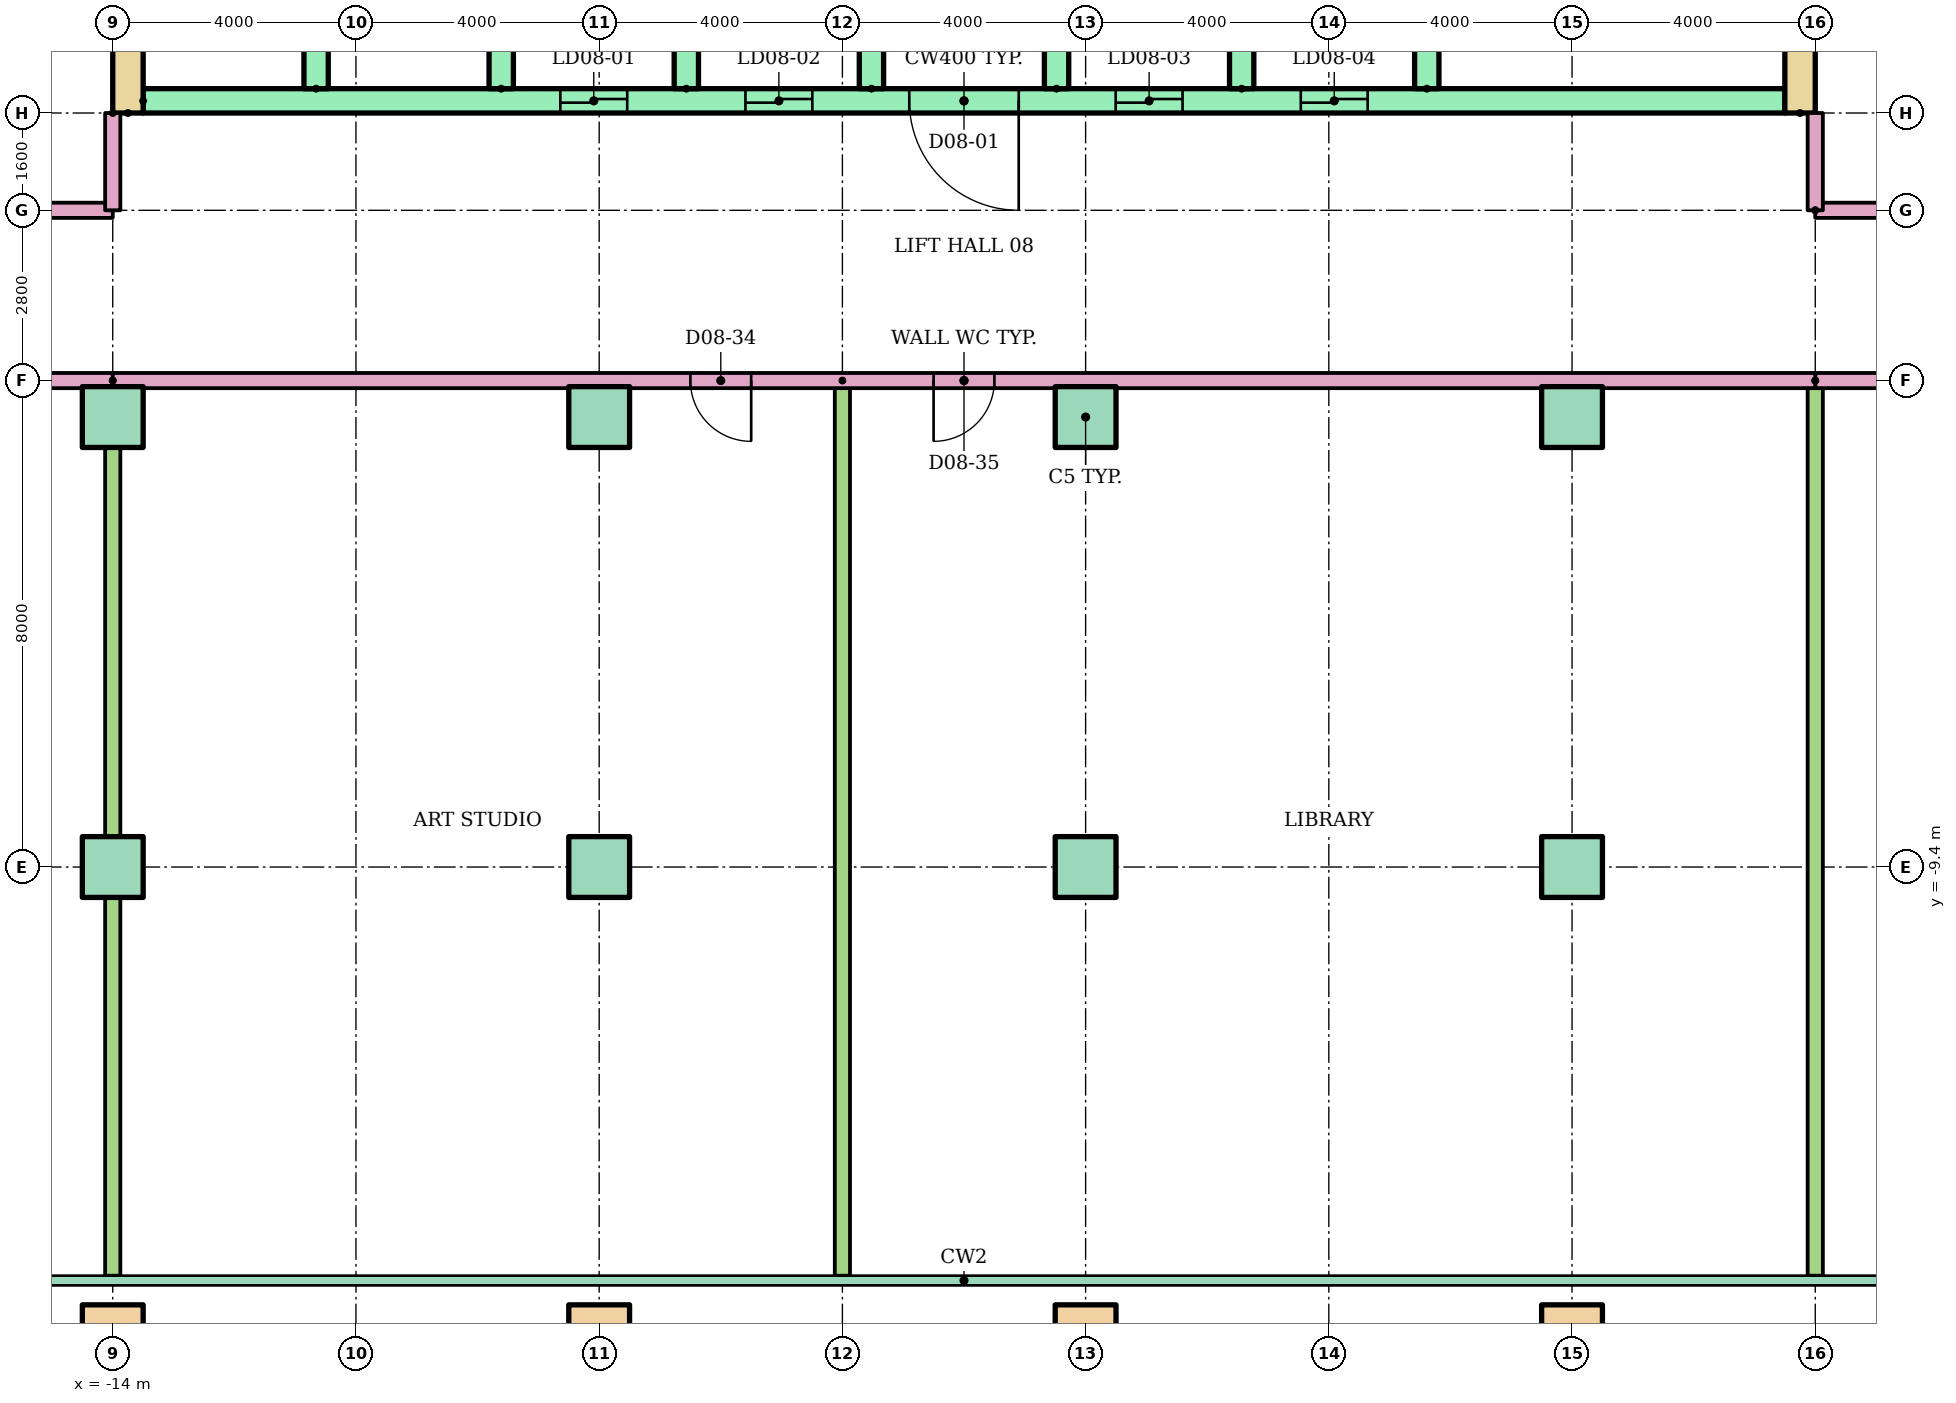
"""IFC4 building model, lengths in metres.
Left out: names, types, materials, properties, quantities, classifications, styles, units other than length and angle.
Written with IfcOpenShell. Run it as: python <this file> out.ifc"""

import sys

from ifc_helpers import new_model, si_unit, direction, frame, frame_2d, origin, origin_2d, place, context, subcontext, project, spatial, rectangle, hollow_rectangle, extrude, element, fill, save


model = new_model("IFC4")
c1 = context("Model", 3, precision=1e-05, world=origin(), true_north=direction((0.0, 1.0)))
c2 = subcontext(c1, "Body", "Model", "MODEL_VIEW")
j1 = project(units=[si_unit("LENGTHUNIT", "METRE"), si_unit("PLANEANGLEUNIT", "RADIAN")], contexts=[c1])
p1 = place(None, origin())
s1 = spatial("IfcSite", under=j1, at=p1, CompositionType="ELEMENT")
p2 = place(p1, origin())
s2 = spatial("IfcBuilding", under=s1, at=p2, CompositionType="ELEMENT")
p3 = place(p2, frame((0.0, 0.0, 33.8)))
s3 = spatial("IfcBuildingStorey", under=s2, at=p3, CompositionType="ELEMENT", Elevation=33.8)
for number, where in (
    (1, (-14.0, -17.1, 0.0)),
    (2, (-6.0, -17.1, 0.0)),
    (3, (2.0, -17.1, 0.0)),
    (4, (10.0, -17.1, 0.0)),
):
    element("IfcColumn", number, at=place(p3, frame(where)), inside=s3, PredefinedType="COLUMN", context=c2, shape_type="SweptSolid", body=[
        extrude(hollow_rectangle(XDim=1.0, YDim=1.0, WallThickness=0.05, at=origin_2d()), origin(), (0.0, 0.0, 1.0), 3.9),
    ])
for number, where in (
    (5, (-14.0, -9.4, 0.0)),
    (6, (-6.0, -9.4, 0.0)),
    (7, (2.0, -9.4, 0.0)),
    (8, (10.0, -9.4, 0.0)),
    (9, (-14.0, -2.0, 0.0)),
    (10, (-6.0, -2.0, 0.0)),
    (11, (2.0, -2.0, 0.0)),
    (12, (10.0, -2.0, 0.0)),
):
    element("IfcColumn", number, at=place(p3, frame(where)), inside=s3, PredefinedType="COLUMN", context=c2, shape_type="SweptSolid", body=[
        extrude(rectangle(XDim=1.0, YDim=1.0, at=origin_2d()), origin(), (0.0, 0.0, 1.0), 3.9),
    ])
for number, where, z_axis, x_axis in (
    (13, (-13.75, 3.0, 0.0), (0.0, 0.0, 1.0), (0.0, 1.0, 0.0)),
    (14, (13.75, 3.0, 0.0), (0.0, 0.0, 1.0), (0.0, 1.0, 0.0)),
):
    element("IfcWall", number, at=place(p3, frame(where, z_axis=z_axis, x_axis=x_axis)), inside=s3, PredefinedType="SHEAR", context=c2, shape_type="SweptSolid", body=[
        extrude(rectangle(XDim=17.0, YDim=0.5, at=frame_2d((8.5, 0.0))), origin(), (0.0, 0.0, 1.0), 3.6),
    ])
p4 = place(p3, frame((-13.5, 3.2, 0.0)))
e15 = element("IfcWall", 15, at=p4, inside=s3, PredefinedType="SHEAR", context=c2, shape_type="SweptSolid", body=[
    extrude(rectangle(XDim=27.0, YDim=0.4, at=frame_2d((13.5, 0.0))), origin(), (0.0, 0.0, 1.0), 3.6),
])
p5 = place(p4, frame((6.861, 0.0, 0.0)))
e16 = element("IfcOpeningElement", 16, at=p5, cuts=e15, PredefinedType="OPENING", context=c2, shape_type="SweptSolid", body=[
    extrude(rectangle(XDim=1.1, YDim=2.1, at=frame_2d((0.55, 1.05))), frame((0.0, 0.21, 0.0), z_axis=(0.0, -1.0, 0.0), x_axis=(1.0, 0.0, 0.0)), (0.0, 0.0, 1.0), 0.42),
])
p6 = place(p4, frame((9.906, 0.0, 0.0)))
e17 = element("IfcOpeningElement", 17, at=p6, cuts=e15, PredefinedType="OPENING", context=c2, shape_type="SweptSolid", body=[
    extrude(rectangle(XDim=1.1, YDim=2.1, at=frame_2d((0.55, 1.05))), frame((0.0, 0.21, 0.0), z_axis=(0.0, -1.0, 0.0), x_axis=(1.0, 0.0, 0.0)), (0.0, 0.0, 1.0), 0.42),
])
p7 = place(p4, frame((15.994, 0.0, 0.0)))
e18 = element("IfcOpeningElement", 18, at=p7, cuts=e15, PredefinedType="OPENING", context=c2, shape_type="SweptSolid", body=[
    extrude(rectangle(XDim=1.1, YDim=2.1, at=frame_2d((0.55, 1.05))), frame((0.0, 0.21, 0.0), z_axis=(0.0, -1.0, 0.0), x_axis=(1.0, 0.0, 0.0)), (0.0, 0.0, 1.0), 0.42),
])
p8 = place(p4, frame((19.039, 0.0, 0.0)))
e19 = element("IfcOpeningElement", 19, at=p8, cuts=e15, PredefinedType="OPENING", context=c2, shape_type="SweptSolid", body=[
    extrude(rectangle(XDim=1.1, YDim=2.1, at=frame_2d((0.55, 1.05))), frame((0.0, 0.21, 0.0), z_axis=(0.0, -1.0, 0.0), x_axis=(1.0, 0.0, 0.0)), (0.0, 0.0, 1.0), 0.42),
])
p9 = place(p4, frame((12.6, 0.0, 0.0)))
e20 = element("IfcOpeningElement", 20, at=p9, cuts=e15, PredefinedType="OPENING", context=c2, shape_type="SweptSolid", body=[
    extrude(rectangle(XDim=1.8, YDim=2.1, at=frame_2d((0.9, 1.05))), frame((0.0, 0.21, 0.0), z_axis=(0.0, -1.0, 0.0), x_axis=(1.0, 0.0, 0.0)), (0.0, 0.0, 1.0), 0.42),
])
for number, where, z_axis, x_axis in (
    (21, (-10.656, 3.4, 0.0), (0.0, 0.0, 1.0), (0.0, 1.0, 0.0)),
    (22, (-7.611, 3.4, 0.0), (0.0, 0.0, 1.0), (0.0, 1.0, 0.0)),
    (23, (-4.567, 3.4, 0.0), (0.0, 0.0, 1.0), (0.0, 1.0, 0.0)),
    (24, (-1.522, 3.4, 0.0), (0.0, 0.0, 1.0), (0.0, 1.0, 0.0)),
    (25, (1.522, 3.4, 0.0), (0.0, 0.0, 1.0), (0.0, 1.0, 0.0)),
    (26, (4.567, 3.4, 0.0), (0.0, 0.0, 1.0), (0.0, 1.0, 0.0)),
    (27, (7.611, 3.4, 0.0), (0.0, 0.0, 1.0), (0.0, 1.0, 0.0)),
):
    element("IfcWall", number, at=place(p3, frame(where, z_axis=z_axis, x_axis=x_axis)), inside=s3, PredefinedType="SHEAR", context=c2, shape_type="SweptSolid", body=[
        extrude(rectangle(XDim=3.0, YDim=0.4, at=frame_2d((1.5, 0.0))), origin(), (0.0, 0.0, 1.0), 3.6),
    ])
p10 = place(p3, frame((-14.0, -1.4, 0.0), z_axis=(0.0, 0.0, 1.0), x_axis=(-1.0, 0.0, 0.0)))
e28 = element("IfcWall", 28, at=p10, inside=s3, PredefinedType="PARTITIONING", context=c2, shape_type="SweptSolid", body=[
    extrude(rectangle(XDim=15.0, YDim=0.25, at=frame_2d((7.5, 0.0))), origin(), (0.0, 0.0, 1.0), 3.1),
])
p11 = place(p10, frame((1.5, 0.0, 0.0)))
e29 = element("IfcOpeningElement", 29, at=p11, cuts=e28, PredefinedType="OPENING", context=c2, shape_type="SweptSolid", body=[
    extrude(rectangle(XDim=1.0, YDim=2.1, at=frame_2d((0.5, 1.05))), frame((0.0, 0.135, 0.0), z_axis=(0.0, -1.0, 0.0), x_axis=(1.0, 0.0, 0.0)), (0.0, 0.0, 1.0), 0.27),
])
p12 = place(p10, frame((8.555, 0.0, 0.0)))
e30 = element("IfcOpeningElement", 30, at=p12, cuts=e28, PredefinedType="OPENING", context=c2, shape_type="SweptSolid", body=[
    extrude(rectangle(XDim=0.9, YDim=2.1, at=frame_2d((0.45, 1.05))), frame((0.0, 0.135, 0.0), z_axis=(0.0, -1.0, 0.0), x_axis=(1.0, 0.0, 0.0)), (0.0, 0.0, 1.0), 0.27),
])
p13 = place(p10, frame((13.5, 0.0, 0.0)))
e31 = element("IfcOpeningElement", 31, at=p13, cuts=e28, PredefinedType="OPENING", context=c2, shape_type="SweptSolid", body=[
    extrude(rectangle(XDim=1.0, YDim=2.1, at=frame_2d((0.5, 1.05))), frame((0.0, 0.135, 0.0), z_axis=(0.0, -1.0, 0.0), x_axis=(1.0, 0.0, 0.0)), (0.0, 0.0, 1.0), 0.27),
])
p14 = place(p3, frame((-14.0, -1.4, 0.0), z_axis=(0.0, 0.0, 1.0), x_axis=(0.0, -1.0, 0.0)))
e32 = element("IfcWall", 32, at=p14, inside=s3, PredefinedType="PARTITIONING", context=c2, shape_type="SweptSolid", body=[
    extrude(rectangle(XDim=14.721, YDim=0.25, at=frame_2d((7.361, 0.0))), origin(), (0.0, 0.0, 1.0), 3.1),
])
p15 = place(p3, frame((-29.0, 1.4, 0.0)))
e33 = element("IfcWall", 33, at=p15, inside=s3, PredefinedType="PARTITIONING", context=c2, shape_type="SweptSolid", body=[
    extrude(rectangle(XDim=15.0, YDim=0.25, at=frame_2d((7.5, 0.0))), origin(), (0.0, 0.0, 1.0), 3.1),
])
p16 = place(p15, frame((12.5, 0.0, 0.0)))
e34 = element("IfcOpeningElement", 34, at=p16, cuts=e33, PredefinedType="OPENING", context=c2, shape_type="SweptSolid", body=[
    extrude(rectangle(XDim=1.0, YDim=2.1, at=frame_2d((0.5, 1.05))), frame((0.0, 0.135, 0.0), z_axis=(0.0, -1.0, 0.0), x_axis=(1.0, 0.0, 0.0)), (0.0, 0.0, 1.0), 0.27),
])
p17 = place(p15, frame((0.5, 0.0, 0.0)))
e35 = element("IfcOpeningElement", 35, at=p17, cuts=e33, PredefinedType="OPENING", context=c2, shape_type="SweptSolid", body=[
    extrude(rectangle(XDim=1.0, YDim=2.1, at=frame_2d((0.5, 1.05))), frame((0.0, 0.135, 0.0), z_axis=(0.0, -1.0, 0.0), x_axis=(1.0, 0.0, 0.0)), (0.0, 0.0, 1.0), 0.27),
])
p18 = place(p3, frame((29.0, -1.4, 0.0), z_axis=(0.0, 0.0, 1.0), x_axis=(-1.0, 0.0, 0.0)))
e36 = element("IfcWall", 36, at=p18, inside=s3, PredefinedType="PARTITIONING", context=c2, shape_type="SweptSolid", body=[
    extrude(rectangle(XDim=15.0, YDim=0.25, at=frame_2d((7.5, 0.0))), origin(), (0.0, 0.0, 1.0), 3.1),
])
p19 = place(p18, frame((12.5, 0.0, 0.0)))
e37 = element("IfcOpeningElement", 37, at=p19, cuts=e36, PredefinedType="OPENING", context=c2, shape_type="SweptSolid", body=[
    extrude(rectangle(XDim=1.0, YDim=2.1, at=frame_2d((0.5, 1.05))), frame((0.0, 0.135, 0.0), z_axis=(0.0, -1.0, 0.0), x_axis=(1.0, 0.0, 0.0)), (0.0, 0.0, 1.0), 0.27),
])
p20 = place(p18, frame((0.5, 0.0, 0.0)))
e38 = element("IfcOpeningElement", 38, at=p20, cuts=e36, PredefinedType="OPENING", context=c2, shape_type="SweptSolid", body=[
    extrude(rectangle(XDim=1.0, YDim=2.1, at=frame_2d((0.5, 1.05))), frame((0.0, 0.135, 0.0), z_axis=(0.0, -1.0, 0.0), x_axis=(1.0, 0.0, 0.0)), (0.0, 0.0, 1.0), 0.27),
])
p21 = place(p3, frame((14.0, -1.4, 0.0), z_axis=(0.0, 0.0, 1.0), x_axis=(0.0, -1.0, 0.0)))
e39 = element("IfcWall", 39, at=p21, inside=s3, PredefinedType="PARTITIONING", context=c2, shape_type="SweptSolid", body=[
    extrude(rectangle(XDim=14.721, YDim=0.25, at=frame_2d((7.361, 0.0))), origin(), (0.0, 0.0, 1.0), 3.1),
])
p22 = place(p3, frame((14.0, 1.4, 0.0)))
e40 = element("IfcWall", 40, at=p22, inside=s3, PredefinedType="PARTITIONING", context=c2, shape_type="SweptSolid", body=[
    extrude(rectangle(XDim=15.0, YDim=0.25, at=frame_2d((7.5, 0.0))), origin(), (0.0, 0.0, 1.0), 3.1),
])
p23 = place(p22, frame((1.5, 0.0, 0.0)))
e41 = element("IfcOpeningElement", 41, at=p23, cuts=e40, PredefinedType="OPENING", context=c2, shape_type="SweptSolid", body=[
    extrude(rectangle(XDim=1.0, YDim=2.1, at=frame_2d((0.5, 1.05))), frame((0.0, 0.135, 0.0), z_axis=(0.0, -1.0, 0.0), x_axis=(1.0, 0.0, 0.0)), (0.0, 0.0, 1.0), 0.27),
])
p24 = place(p22, frame((8.3, 0.0, 0.0)))
e42 = element("IfcOpeningElement", 42, at=p24, cuts=e40, PredefinedType="OPENING", context=c2, shape_type="SweptSolid", body=[
    extrude(rectangle(XDim=1.0, YDim=2.1, at=frame_2d((0.5, 1.05))), frame((0.0, 0.135, 0.0), z_axis=(0.0, -1.0, 0.0), x_axis=(1.0, 0.0, 0.0)), (0.0, 0.0, 1.0), 0.27),
])
p25 = place(p22, frame((13.5, 0.0, 0.0)))
e43 = element("IfcOpeningElement", 43, at=p25, cuts=e40, PredefinedType="OPENING", context=c2, shape_type="SweptSolid", body=[
    extrude(rectangle(XDim=1.0, YDim=2.1, at=frame_2d((0.5, 1.05))), frame((0.0, 0.135, 0.0), z_axis=(0.0, -1.0, 0.0), x_axis=(1.0, 0.0, 0.0)), (0.0, 0.0, 1.0), 0.27),
])
p26 = place(p3, frame((-2.0, -1.4, 0.0), z_axis=(0.0, 0.0, 1.0), x_axis=(0.0, -1.0, 0.0)))
e44 = element("IfcWall", 44, at=p26, inside=s3, PredefinedType="PARTITIONING", context=c2, shape_type="SweptSolid", body=[
    extrude(rectangle(XDim=14.721, YDim=0.25, at=frame_2d((7.361, 0.0))), origin(), (0.0, 0.0, 1.0), 3.1),
])
p27 = place(p3, frame((14.0, -1.4, 0.0), z_axis=(0.0, 0.0, 1.0), x_axis=(-1.0, 0.0, 0.0)))
e45 = element("IfcWall", 45, at=p27, inside=s3, PredefinedType="PARTITIONING", context=c2, shape_type="SweptSolid", body=[
    extrude(rectangle(XDim=28.0, YDim=0.25, at=frame_2d((14.0, 0.0))), origin(), (0.0, 0.0, 1.0), 3.1),
])
p28 = place(p27, frame((17.5, 0.0, 0.0)))
e46 = element("IfcOpeningElement", 46, at=p28, cuts=e45, PredefinedType="OPENING", context=c2, shape_type="SweptSolid", body=[
    extrude(rectangle(XDim=1.0, YDim=2.1, at=frame_2d((0.5, 1.05))), frame((0.0, 0.135, 0.0), z_axis=(0.0, -1.0, 0.0), x_axis=(1.0, 0.0, 0.0)), (0.0, 0.0, 1.0), 0.27),
])
p29 = place(p27, frame((13.5, 0.0, 0.0)))
e47 = element("IfcOpeningElement", 47, at=p29, cuts=e45, PredefinedType="OPENING", context=c2, shape_type="SweptSolid", body=[
    extrude(rectangle(XDim=1.0, YDim=2.1, at=frame_2d((0.5, 1.05))), frame((0.0, 0.135, 0.0), z_axis=(0.0, -1.0, 0.0), x_axis=(1.0, 0.0, 0.0)), (0.0, 0.0, 1.0), 0.27),
])
for number, where, z_axis, x_axis in (
    (48, (-14.0, 3.0, 0.0), (0.0, 0.0, 1.0), (0.0, -1.0, 0.0)),
    (49, (14.0, 1.4, 0.0), (0.0, 0.0, 1.0), (0.0, 1.0, 0.0)),
):
    element("IfcWall", number, at=place(p3, frame(where, z_axis=z_axis, x_axis=x_axis)), inside=s3, PredefinedType="PARTITIONING", context=c2, shape_type="SweptSolid", body=[
        extrude(rectangle(XDim=1.6, YDim=0.25, at=frame_2d((0.8, 0.0))), origin(), (0.0, 0.0, 1.0), 3.1),
    ])
p30 = place(p5, origin())
e50 = element("IfcDoor", 50, at=p30, inside=s3, OperationType="SLIDING_TO_LEFT", PredefinedType="DOOR", context=c2, shape_type="SweptSolid", body=[
    extrude(rectangle(XDim=1.1, YDim=2.1, at=frame_2d((0.55, 1.05))), frame((0.0, 0.025, 0.0), z_axis=(0.0, -1.0, 0.0), x_axis=(1.0, 0.0, 0.0)), (0.0, 0.0, 1.0), 0.05),
])
fill(e16, e50)
p31 = place(p6, origin())
e51 = element("IfcDoor", 51, at=p31, inside=s3, OperationType="SLIDING_TO_LEFT", PredefinedType="DOOR", context=c2, shape_type="SweptSolid", body=[
    extrude(rectangle(XDim=1.1, YDim=2.1, at=frame_2d((0.55, 1.05))), frame((0.0, 0.025, 0.0), z_axis=(0.0, -1.0, 0.0), x_axis=(1.0, 0.0, 0.0)), (0.0, 0.0, 1.0), 0.05),
])
fill(e17, e51)
p32 = place(p7, origin())
e52 = element("IfcDoor", 52, at=p32, inside=s3, OperationType="SLIDING_TO_LEFT", PredefinedType="DOOR", context=c2, shape_type="SweptSolid", body=[
    extrude(rectangle(XDim=1.1, YDim=2.1, at=frame_2d((0.55, 1.05))), frame((0.0, 0.025, 0.0), z_axis=(0.0, -1.0, 0.0), x_axis=(1.0, 0.0, 0.0)), (0.0, 0.0, 1.0), 0.05),
])
fill(e18, e52)
p33 = place(p8, origin())
e53 = element("IfcDoor", 53, at=p33, inside=s3, OperationType="SLIDING_TO_LEFT", PredefinedType="DOOR", context=c2, shape_type="SweptSolid", body=[
    extrude(rectangle(XDim=1.1, YDim=2.1, at=frame_2d((0.55, 1.05))), frame((0.0, 0.025, 0.0), z_axis=(0.0, -1.0, 0.0), x_axis=(1.0, 0.0, 0.0)), (0.0, 0.0, 1.0), 0.05),
])
fill(e19, e53)
p34 = place(p9, frame((1.8, 0.0, 0.0), z_axis=(0.0, 0.0, 1.0), x_axis=(-1.0, 0.0, 0.0)))
e54 = element("IfcDoor", 54, at=p34, inside=s3, OperationType="DOUBLE_DOOR_SINGLE_SWING", PredefinedType="DOOR", context=c2, shape_type="SweptSolid", body=[
    extrude(rectangle(XDim=1.8, YDim=2.1, at=frame_2d((0.9, 1.05))), frame((0.0, 0.025, 0.0), z_axis=(0.0, -1.0, 0.0), x_axis=(1.0, 0.0, 0.0)), (0.0, 0.0, 1.0), 0.05),
])
fill(e20, e54)
p35 = place(p28, origin())
e55 = element("IfcDoor", 55, at=p35, inside=s3, OperationType="SINGLE_SWING_LEFT", PredefinedType="DOOR", context=c2, shape_type="SweptSolid", body=[
    extrude(rectangle(XDim=1.0, YDim=2.1, at=frame_2d((0.5, 1.05))), frame((0.0, 0.025, 0.0), z_axis=(0.0, -1.0, 0.0), x_axis=(1.0, 0.0, 0.0)), (0.0, 0.0, 1.0), 0.05),
])
fill(e46, e55)
p36 = place(p29, origin())
e56 = element("IfcDoor", 56, at=p36, inside=s3, OperationType="SINGLE_SWING_RIGHT", PredefinedType="DOOR", context=c2, shape_type="SweptSolid", body=[
    extrude(rectangle(XDim=1.0, YDim=2.1, at=frame_2d((0.5, 1.05))), frame((0.0, 0.025, 0.0), z_axis=(0.0, -1.0, 0.0), x_axis=(1.0, 0.0, 0.0)), (0.0, 0.0, 1.0), 0.05),
])
fill(e47, e56)
save(model, sys.argv[1])
